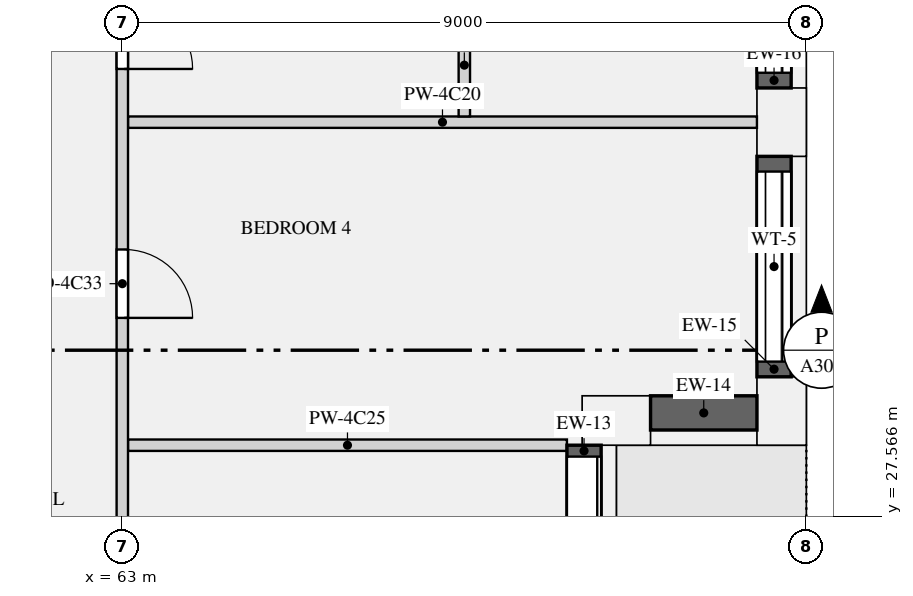
"""IFC4 building model, lengths in metres.
Left out: names, types, materials, properties, quantities, classifications, styles, units other than length and angle.
Written with IfcOpenShell. Run it as: python <this file> out.ifc"""

import sys

from ifc_helpers import new_model, si_unit, direction, frame, frame_2d, origin, origin_2d, place, context, subcontext, project, spatial, rectangle, extrude, element, fill, save


model = new_model("IFC4")
c1 = context("Model", 3, precision=1e-05, world=origin(), true_north=direction((0.0, 1.0)))
c2 = subcontext(c1, "Body", "Model", "MODEL_VIEW")
j1 = project(units=[si_unit("LENGTHUNIT", "METRE"), si_unit("PLANEANGLEUNIT", "RADIAN")], contexts=[c1])
p1 = place(None, origin())
s1 = spatial("IfcSite", under=j1, at=p1, CompositionType="ELEMENT")
p2 = place(p1, origin())
s2 = spatial("IfcBuilding", under=s1, at=p2, CompositionType="ELEMENT")
p3 = place(p2, frame((0.0, 0.0, 216.9)))
s3 = spatial("IfcBuildingStorey", under=s2, at=p3, CompositionType="ELEMENT", Elevation=216.9)
for number, where, z_axis, x_axis in (
    (1, (69.5, 28.825, 0.0), (0.0, 0.0, 1.0), (1.0, 0.0, 0.0)),
    (2, (71.675, 28.95, 0.0), (0.0, 0.0, 1.0), (0.0, 1.0, 0.0)),
    (3, (71.675, 32.75, 0.0), (0.0, 0.0, 1.0), (0.0, 1.0, 0.0)),
):
    element("IfcColumn", number, at=place(p3, frame(where, z_axis=z_axis, x_axis=x_axis)), inside=s3, PredefinedType="USERDEFINED", context=c2, shape_type="SweptSolid", body=[
        extrude(rectangle(XDim=0.9, YDim=0.65, at=origin_2d()), origin(), (0.0, 0.0, 1.0), 3.15),
    ])
p4 = place(p3, frame((69.075, 24.95, 0.0), z_axis=(0.0, 0.0, 1.0), x_axis=(0.0, 1.0, 0.0)))
e4 = element("IfcWall", 4, at=p4, inside=s3, PredefinedType="SOLIDWALL", context=c2, shape_type="SweptSolid", body=[
    extrude(rectangle(XDim=3.55, YDim=0.45, at=frame_2d((1.775, 0.0))), origin(), (0.0, 0.0, 1.0), 2.83),
])
p5 = place(p4, frame((0.15, 0.0, 0.0)))
e5 = element("IfcOpeningElement", 5, at=p5, cuts=e4, PredefinedType="OPENING", context=c2, shape_type="SweptSolid", body=[
    extrude(rectangle(XDim=3.25, YDim=2.3, at=frame_2d((1.625, 1.15))), frame((0.0, 0.235, 0.0), z_axis=(0.0, -1.0, 0.0), x_axis=(1.0, 0.0, 0.0)), (0.0, 0.0, 1.0), 0.47),
])
p6 = place(p3, frame((69.95, 28.925, 0.9), z_axis=(0.0, 0.0, 1.0), x_axis=(1.0, 0.0, 0.0)))
e6 = element("IfcWall", 6, at=p6, inside=s3, PredefinedType="SOLIDWALL", context=c2, shape_type="SweptSolid", body=[
    extrude(rectangle(XDim=1.4, YDim=0.45, at=frame_2d((0.7, 0.0))), origin(), (0.0, 0.0, 1.0), 1.93),
])
p7 = place(p3, frame((71.575, 29.4, 0.9), z_axis=(0.0, 0.0, 1.0), x_axis=(0.0, 1.0, 0.0)))
e7 = element("IfcWall", 7, at=p7, inside=s3, PredefinedType="SOLIDWALL", context=c2, shape_type="SweptSolid", body=[
    extrude(rectangle(XDim=2.9, YDim=0.45, at=frame_2d((1.45, 0.0))), origin(), (0.0, 0.0, 1.0), 1.93),
])
p8 = place(p7, frame((0.2, 0.0, 0.15)))
e8 = element("IfcOpeningElement", 8, at=p8, cuts=e7, PredefinedType="OPENING", context=c2, shape_type="SweptSolid", body=[
    extrude(rectangle(XDim=2.5, YDim=1.5, at=frame_2d((1.25, 0.75))), frame((0.0, 0.235, 0.0), z_axis=(0.0, -1.0, 0.0), x_axis=(1.0, 0.0, 0.0)), (0.0, 0.0, 1.0), 0.47),
])
p9 = place(p3, frame((71.575, 33.2, 0.9), z_axis=(0.0, 0.0, 1.0), x_axis=(0.0, 1.0, 0.0)))
e9 = element("IfcWall", 9, at=p9, inside=s3, PredefinedType="SOLIDWALL", context=c2, shape_type="SweptSolid", body=[
    extrude(rectangle(XDim=3.15, YDim=0.45, at=frame_2d((1.575, 0.0))), origin(), (0.0, 0.0, 1.0), 1.93),
])
p10 = place(p9, frame((0.2, 0.0, 0.15)))
e10 = element("IfcOpeningElement", 10, at=p10, cuts=e9, PredefinedType="OPENING", context=c2, shape_type="SweptSolid", body=[
    extrude(rectangle(XDim=2.75, YDim=1.5, at=frame_2d((1.375, 0.75))), frame((0.0, 0.235, 0.0), z_axis=(0.0, -1.0, 0.0), x_axis=(1.0, 0.0, 0.0)), (0.0, 0.0, 1.0), 0.47),
])
p11 = place(p3, frame((63.075, 32.75, 0.0), z_axis=(0.0, 0.0, 1.0), x_axis=(1.0, 0.0, 0.0)))
e11 = element("IfcWall", 11, at=p11, inside=s3, PredefinedType="PARTITIONING", context=c2, shape_type="SweptSolid", body=[
    extrude(rectangle(XDim=8.275, YDim=0.15, at=frame_2d((4.138, 0.0))), origin(), (0.0, 0.0, 1.0), 2.83),
])
p12 = place(p3, frame((63.075, 28.5, 0.0), z_axis=(0.0, 0.0, 1.0), x_axis=(1.0, 0.0, 0.0)))
e12 = element("IfcWall", 12, at=p12, inside=s3, PredefinedType="PARTITIONING", context=c2, shape_type="SweptSolid", body=[
    extrude(rectangle(XDim=5.775, YDim=0.15, at=frame_2d((2.888, 0.0))), origin(), (0.0, 0.0, 1.0), 2.83),
])
p13 = place(p3, frame((63.0, 16.575, 0.0), z_axis=(0.0, 0.0, 1.0), x_axis=(0.0, 1.0, 0.0)))
e13 = element("IfcWall", 13, at=p13, inside=s3, PredefinedType="PARTITIONING", context=c2, shape_type="SweptSolid", body=[
    extrude(rectangle(XDim=24.275, YDim=0.15, at=frame_2d((12.138, 0.0))), origin(), (0.0, 0.0, 1.0), 2.83),
])
p14 = place(p13, frame((2.7, 0.0, 0.0)))
e14 = element("IfcOpeningElement", 14, at=p14, cuts=e13, PredefinedType="OPENING", context=c2, shape_type="SweptSolid", body=[
    extrude(rectangle(XDim=1.5, YDim=2.1, at=frame_2d((0.75, 1.05))), frame((0.0, 0.085, 0.0), z_axis=(0.0, -1.0, 0.0), x_axis=(1.0, 0.0, 0.0)), (0.0, 0.0, 1.0), 0.17),
])
p15 = place(p13, frame((13.6, 0.0, 0.0)))
e15 = element("IfcOpeningElement", 15, at=p15, cuts=e13, PredefinedType="OPENING", context=c2, shape_type="SweptSolid", body=[
    extrude(rectangle(XDim=0.9, YDim=2.1, at=frame_2d((0.45, 1.05))), frame((0.0, 0.085, 0.0), z_axis=(0.0, -1.0, 0.0), x_axis=(1.0, 0.0, 0.0)), (0.0, 0.0, 1.0), 0.17),
])
p16 = place(p13, frame((16.875, 0.0, 0.0)))
e16 = element("IfcOpeningElement", 16, at=p16, cuts=e13, PredefinedType="OPENING", context=c2, shape_type="SweptSolid", body=[
    extrude(rectangle(XDim=0.9, YDim=2.1, at=frame_2d((0.45, 1.05))), frame((0.0, 0.085, 0.0), z_axis=(0.0, -1.0, 0.0), x_axis=(1.0, 0.0, 0.0)), (0.0, 0.0, 1.0), 0.17),
])
p17 = place(p3, frame((67.5, 32.825, 0.0), z_axis=(0.0, 0.0, 1.0), x_axis=(0.0, 1.0, 0.0)))
e17 = element("IfcWall", 17, at=p17, inside=s3, PredefinedType="PARTITIONING", context=c2, shape_type="SweptSolid", body=[
    extrude(rectangle(XDim=3.525, YDim=0.15, at=frame_2d((1.763, 0.0))), origin(), (0.0, 0.0, 1.0), 2.83),
])
p18 = place(p17, frame((1.35, 0.0, 0.0)))
e18 = element("IfcOpeningElement", 18, at=p18, cuts=e17, PredefinedType="OPENING", context=c2, shape_type="SweptSolid", body=[
    extrude(rectangle(XDim=0.9, YDim=2.1, at=frame_2d((0.45, 1.05))), frame((0.0, 0.085, 0.0), z_axis=(0.0, -1.0, 0.0), x_axis=(1.0, 0.0, 0.0)), (0.0, 0.0, 1.0), 0.17),
])
p19 = place(p5, origin())
e19 = element("IfcDoor", 19, at=p19, inside=s3, OperationType="SLIDING_TO_LEFT", PredefinedType="DOOR", context=c2, shape_type="SweptSolid", body=[
    extrude(rectangle(XDim=3.25, YDim=2.3, at=frame_2d((1.625, 1.15))), frame((0.0, -0.07, 0.0), z_axis=(0.0, -1.0, 0.0), x_axis=(1.0, 0.0, 0.0)), (0.0, 0.0, 1.0), 0.05),
])
fill(e5, e19)
p20 = place(p8, origin())
e20 = element("IfcWindow", 20, at=p20, inside=s3, PartitioningType="SINGLE_PANEL", PredefinedType="WINDOW", context=c2, shape_type="SweptSolid", body=[
    extrude(rectangle(XDim=2.5, YDim=1.5, at=frame_2d((1.25, 0.75))), frame((0.0, -0.065, 0.0), z_axis=(0.0, -1.0, 0.0), x_axis=(1.0, 0.0, 0.0)), (0.0, 0.0, 1.0), 0.06),
])
fill(e8, e20)
p21 = place(p10, origin())
e21 = element("IfcWindow", 21, at=p21, inside=s3, PartitioningType="SINGLE_PANEL", PredefinedType="WINDOW", context=c2, shape_type="SweptSolid", body=[
    extrude(rectangle(XDim=2.75, YDim=1.5, at=frame_2d((1.375, 0.75))), frame((0.0, -0.065, 0.0), z_axis=(0.0, -1.0, 0.0), x_axis=(1.0, 0.0, 0.0)), (0.0, 0.0, 1.0), 0.06),
])
fill(e10, e21)
p22 = place(p15, frame((0.9, 0.0, 0.0), z_axis=(0.0, 0.0, 1.0), x_axis=(-1.0, 0.0, 0.0)))
e22 = element("IfcDoor", 22, at=p22, inside=s3, OperationType="SINGLE_SWING_RIGHT", PredefinedType="DOOR", context=c2, shape_type="SweptSolid", body=[
    extrude(rectangle(XDim=0.9, YDim=2.1, at=frame_2d((0.45, 1.05))), frame((0.0, 0.025, 0.0), z_axis=(0.0, -1.0, 0.0), x_axis=(1.0, 0.0, 0.0)), (0.0, 0.0, 1.0), 0.05),
])
fill(e15, e22)
p23 = place(p16, frame((0.9, 0.0, 0.0), z_axis=(0.0, 0.0, 1.0), x_axis=(-1.0, 0.0, 0.0)))
e23 = element("IfcDoor", 23, at=p23, inside=s3, OperationType="SINGLE_SWING_RIGHT", PredefinedType="DOOR", context=c2, shape_type="SweptSolid", body=[
    extrude(rectangle(XDim=0.9, YDim=2.1, at=frame_2d((0.45, 1.05))), frame((0.0, 0.025, 0.0), z_axis=(0.0, -1.0, 0.0), x_axis=(1.0, 0.0, 0.0)), (0.0, 0.0, 1.0), 0.05),
])
fill(e16, e23)
save(model, sys.argv[1])
